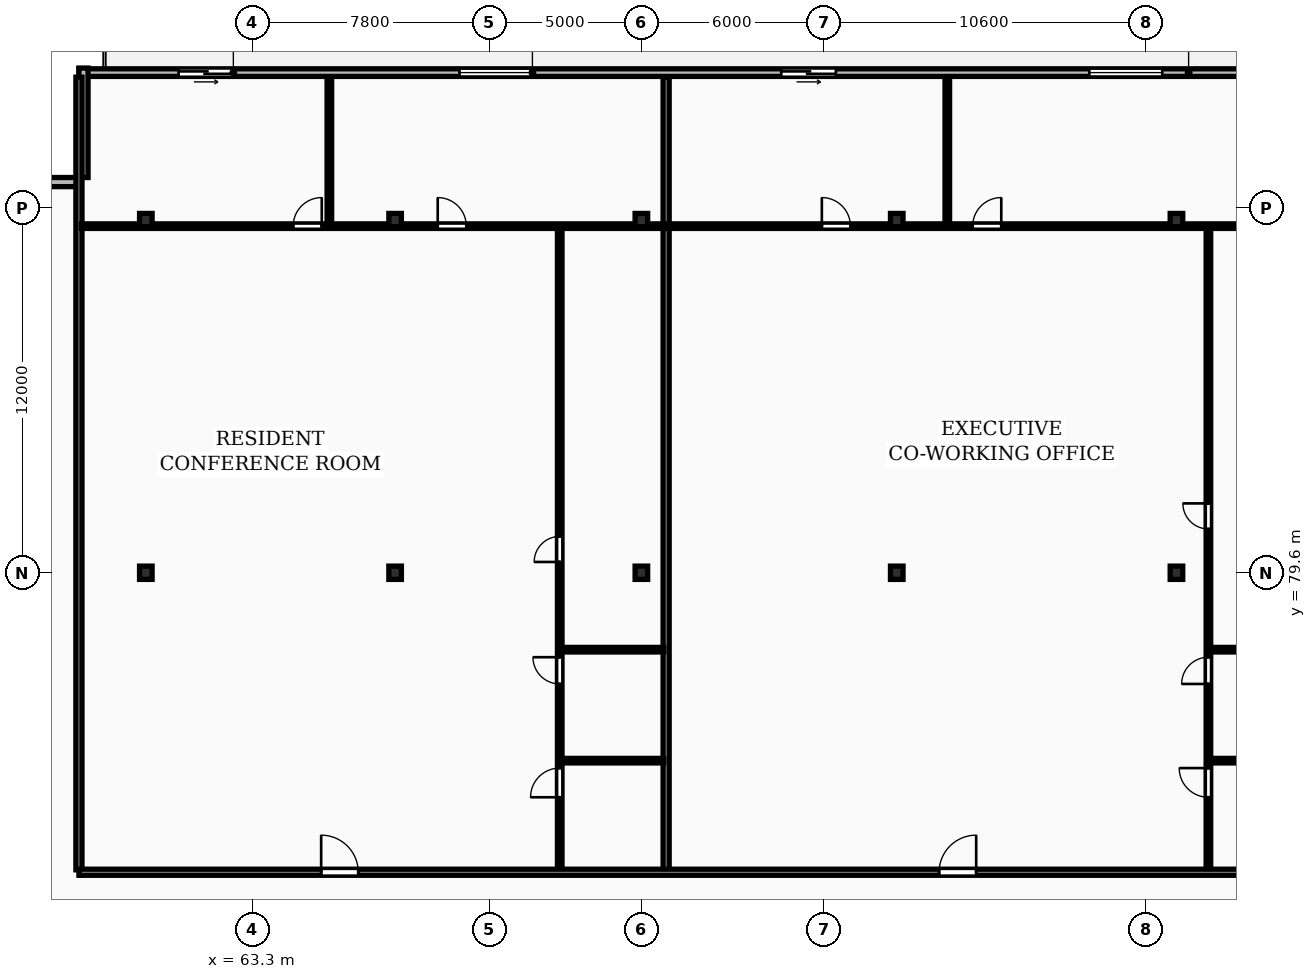
"""IFC4 building model, lengths in metres.
Left out: names, types, materials, properties, quantities, classifications, styles, units other than length and angle.
Written with IfcOpenShell. Run it as: python <this file> out.ifc"""

import sys

from ifc_helpers import new_model, si_unit, direction, frame, frame_2d, origin, origin_2d, place, context, subcontext, project, spatial, rectangle, i_section, extrude, element, fill, save


model = new_model("IFC4")
c1 = context("Model", 3, precision=1e-05, world=origin(), true_north=direction((0.0, 1.0)))
c2 = subcontext(c1, "Body", "Model", "MODEL_VIEW")
j1 = project(units=[si_unit("LENGTHUNIT", "METRE"), si_unit("PLANEANGLEUNIT", "RADIAN")], contexts=[c1])
p1 = place(None, origin())
s1 = spatial("IfcSite", under=j1, at=p1, CompositionType="ELEMENT")
p2 = place(p1, origin())
s2 = spatial("IfcBuilding", under=s1, at=p2, CompositionType="ELEMENT")
p3 = place(p2, frame((0.0, 0.0, 142.9)))
s3 = spatial("IfcBuildingStorey", under=s2, at=p3, CompositionType="ELEMENT", Elevation=142.9)
for number, where, z_axis, x_axis in (
    (1, (59.8, 79.6, 0.0), (0.0, 0.0, 1.0), (1.0, 0.0, 0.0)),
    (2, (59.8, 91.2, 0.0), (0.0, 0.0, 1.0), (1.0, 0.0, 0.0)),
    (3, (68.0, 79.6, 0.0), (0.0, 0.0, 1.0), (1.0, 0.0, 0.0)),
    (4, (68.0, 91.2, 0.0), (0.0, 0.0, 1.0), (1.0, 0.0, 0.0)),
    (5, (76.1, 79.6, 0.0), (0.0, 0.0, 1.0), (1.0, 0.0, 0.0)),
    (6, (76.1, 91.2, 0.0), (0.0, 0.0, 1.0), (1.0, 0.0, 0.0)),
    (7, (84.5, 79.6, 0.0), (0.0, 0.0, 1.0), (1.0, 0.0, 0.0)),
    (8, (84.5, 91.2, 0.0), (0.0, 0.0, 1.0), (1.0, 0.0, 0.0)),
    (9, (93.7, 79.6, 0.0), (0.0, 0.0, 1.0), (1.0, 0.0, 0.0)),
    (10, (93.7, 91.2, 0.0), (0.0, 0.0, 1.0), (1.0, 0.0, 0.0)),
):
    element("IfcColumn", number, at=place(p3, frame(where, z_axis=z_axis, x_axis=x_axis)), inside=s3, PredefinedType="COLUMN", context=c2, shape_type="SweptSolid", body=[
        extrude(i_section(OverallWidth=0.412, OverallDepth=0.437, WebThickness=0.036, FlangeThickness=0.052, FilletRadius=0.015, at=origin_2d()), origin(), (0.0, 0.0, 1.0), 3.6),
    ])
p4 = place(p3, frame((130.6, 96.05, 0.0), z_axis=(0.0, 0.0, 1.0), x_axis=(-1.0, 0.0, 0.0)))
e11 = element("IfcWall", 11, at=p4, inside=s3, PredefinedType="STANDARD", context=c2, shape_type="SweptSolid", body=[
    extrude(rectangle(XDim=73.0, YDim=0.25, at=frame_2d((36.5, 0.0))), origin(), (0.0, 0.0, 1.0), 3.31),
])
p5 = place(p4, frame((67.921, 0.0, 0.0)))
e12 = element("IfcOpeningElement", 12, at=p5, cuts=e11, PredefinedType="OPENING", context=c2, shape_type="SweptSolid", body=[
    extrude(rectangle(XDim=1.8, YDim=2.2, at=frame_2d((0.9, 1.1))), frame((0.0, 0.135, 0.0), z_axis=(0.0, -1.0, 0.0), x_axis=(1.0, 0.0, 0.0)), (0.0, 0.0, 1.0), 0.27),
])
p6 = place(p4, frame((58.084, 0.0, 0.85)))
e13 = element("IfcOpeningElement", 13, at=p6, cuts=e11, PredefinedType="OPENING", context=c2, shape_type="SweptSolid", body=[
    extrude(rectangle(XDim=2.4, YDim=1.9, at=frame_2d((1.2, 0.95))), frame((0.0, 0.135, 0.0), z_axis=(0.0, -1.0, 0.0), x_axis=(1.0, 0.0, 0.0)), (0.0, 0.0, 1.0), 0.27),
])
p7 = place(p4, frame((48.101, 0.0, 0.0)))
e14 = element("IfcOpeningElement", 14, at=p7, cuts=e11, PredefinedType="OPENING", context=c2, shape_type="SweptSolid", body=[
    extrude(rectangle(XDim=1.8, YDim=2.2, at=frame_2d((0.9, 1.1))), frame((0.0, 0.135, 0.0), z_axis=(0.0, -1.0, 0.0), x_axis=(1.0, 0.0, 0.0)), (0.0, 0.0, 1.0), 0.27),
])
p8 = place(p4, frame((37.368, 0.0, 0.85)))
e15 = element("IfcOpeningElement", 15, at=p8, cuts=e11, PredefinedType="OPENING", context=c2, shape_type="SweptSolid", body=[
    extrude(rectangle(XDim=2.4, YDim=1.9, at=frame_2d((1.2, 0.95))), frame((0.0, 0.135, 0.0), z_axis=(0.0, -1.0, 0.0), x_axis=(1.0, 0.0, 0.0)), (0.0, 0.0, 1.0), 0.27),
])
p9 = place(p4, frame((22.445, 0.0, 0.85)))
e16 = element("IfcOpeningElement", 16, at=p9, cuts=e11, PredefinedType="OPENING", context=c2, shape_type="SweptSolid", body=[
    extrude(rectangle(XDim=2.4, YDim=1.9, at=frame_2d((1.2, 0.95))), frame((0.0, 0.135, 0.0), z_axis=(0.0, -1.0, 0.0), x_axis=(1.0, 0.0, 0.0)), (0.0, 0.0, 1.0), 0.27),
])
p10 = place(p4, frame((17.845, 0.0, 0.85)))
e17 = element("IfcOpeningElement", 17, at=p10, cuts=e11, PredefinedType="OPENING", context=c2, shape_type="SweptSolid", body=[
    extrude(rectangle(XDim=2.4, YDim=1.9, at=frame_2d((1.2, 0.95))), frame((0.0, 0.135, 0.0), z_axis=(0.0, -1.0, 0.0), x_axis=(1.0, 0.0, 0.0)), (0.0, 0.0, 1.0), 0.27),
])
p11 = place(p4, frame((28.239, 0.0, 0.0)))
e18 = element("IfcOpeningElement", 18, at=p11, cuts=e11, PredefinedType="OPENING", context=c2, shape_type="SweptSolid", body=[
    extrude(rectangle(XDim=1.8, YDim=2.2, at=frame_2d((0.9, 1.1))), frame((0.0, 0.135, 0.0), z_axis=(0.0, -1.0, 0.0), x_axis=(1.0, 0.0, 0.0)), (0.0, 0.0, 1.0), 0.27),
])
p12 = place(p4, frame((14.599, 0.0, 0.85)))
e19 = element("IfcOpeningElement", 19, at=p12, cuts=e11, PredefinedType="OPENING", context=c2, shape_type="SweptSolid", body=[
    extrude(rectangle(XDim=1.8, YDim=1.8, at=frame_2d((0.9, 0.9))), frame((0.0, 0.135, 0.0), z_axis=(0.0, -1.0, 0.0), x_axis=(1.0, 0.0, 0.0)), (0.0, 0.0, 1.0), 0.27),
])
p13 = place(p4, frame((8.234, 0.0, 0.0)))
e20 = element("IfcOpeningElement", 20, at=p13, cuts=e11, PredefinedType="OPENING", context=c2, shape_type="SweptSolid", body=[
    extrude(rectangle(XDim=1.8, YDim=2.2, at=frame_2d((0.9, 1.1))), frame((0.0, 0.135, 0.0), z_axis=(0.0, -1.0, 0.0), x_axis=(1.0, 0.0, 0.0)), (0.0, 0.0, 1.0), 0.27),
])
p14 = place(p4, frame((0.9, 0.0, 0.85)))
e21 = element("IfcOpeningElement", 21, at=p14, cuts=e11, PredefinedType="OPENING", context=c2, shape_type="SweptSolid", body=[
    extrude(rectangle(XDim=2.4, YDim=1.9, at=frame_2d((1.2, 0.95))), frame((0.0, 0.135, 0.0), z_axis=(0.0, -1.0, 0.0), x_axis=(1.0, 0.0, 0.0)), (0.0, 0.0, 1.0), 0.27),
])
p15 = place(p3, frame((57.75, 96.2, 0.0), z_axis=(0.0, 0.0, 1.0), x_axis=(0.0, -1.0, 0.0)))
e22 = element("IfcWall", 22, at=p15, inside=s3, PredefinedType="STANDARD", context=c2, shape_type="SweptSolid", body=[
    extrude(rectangle(XDim=3.6, YDim=0.3, at=frame_2d((1.8, 0.0))), origin(), (0.0, 0.0, 1.0), 3.31),
])
p16 = place(p3, frame((57.6, 92.45, 0.0), z_axis=(0.0, 0.0, 1.0), x_axis=(-1.0, 0.0, 0.0)))
e23 = element("IfcWall", 23, at=p16, inside=s3, PredefinedType="STANDARD", context=c2, shape_type="SweptSolid", body=[
    extrude(rectangle(XDim=3.6, YDim=0.3, at=frame_2d((1.8, 0.0))), origin(), (0.0, 0.0, 1.0), 3.31),
])
for number, where, z_axis, x_axis in (
    (24, (57.6, 69.83, 0.0), (0.0, 0.0, 1.0), (0.0, 1.0, 0.0)),
    (25, (76.914, 69.83, 0.0), (0.0, 0.0, 1.0), (0.0, 1.0, 0.0)),
):
    element("IfcWall", number, at=place(p3, frame(where, z_axis=z_axis, x_axis=x_axis)), inside=s3, PredefinedType="PARTITIONING", context=c2, shape_type="SweptSolid", body=[
        extrude(rectangle(XDim=26.07, YDim=0.2, at=frame_2d((13.035, 0.0))), origin(), (0.0, 0.0, 1.0), 3.31),
    ])
for number, where, z_axis, x_axis in (
    (26, (73.474, 73.42, 0.0), (0.0, 0.0, 1.0), (1.0, 0.0, 0.0)),
    (27, (73.474, 77.07, 0.0), (0.0, 0.0, 1.0), (1.0, 0.0, 0.0)),
):
    element("IfcWall", number, at=place(p3, frame(where, z_axis=z_axis, x_axis=x_axis)), inside=s3, PredefinedType="PARTITIONING", context=c2, shape_type="SweptSolid", body=[
        extrude(rectangle(XDim=3.36, YDim=0.15, at=frame_2d((1.68, 0.0))), origin(), (0.0, 0.0, 1.0), 3.31),
    ])
p17 = place(p3, frame((73.414, 69.81, 0.0), z_axis=(0.0, 0.0, 1.0), x_axis=(0.0, 1.0, 0.0)))
e28 = element("IfcWall", 28, at=p17, inside=s3, PredefinedType="PARTITIONING", context=c2, shape_type="SweptSolid", body=[
    extrude(rectangle(XDim=21.13, YDim=0.15, at=frame_2d((10.565, 0.0))), origin(), (0.0, 0.0, 1.0), 3.31),
])
p18 = place(p17, frame((2.406, 0.0, 0.0)))
e29 = element("IfcOpeningElement", 29, at=p18, cuts=e28, PredefinedType="OPENING", context=c2, shape_type="SweptSolid", body=[
    extrude(rectangle(XDim=0.96, YDim=2.1, at=frame_2d((0.48, 1.05))), frame((0.0, 0.085, 0.0), z_axis=(0.0, -1.0, 0.0), x_axis=(1.0, 0.0, 0.0)), (0.0, 0.0, 1.0), 0.17),
])
p19 = place(p17, frame((6.133, 0.0, 0.0)))
e30 = element("IfcOpeningElement", 30, at=p19, cuts=e28, PredefinedType="OPENING", context=c2, shape_type="SweptSolid", body=[
    extrude(rectangle(XDim=0.88, YDim=2.06, at=frame_2d((0.44, 1.03))), frame((0.0, 0.085, 0.0), z_axis=(0.0, -1.0, 0.0), x_axis=(1.0, 0.0, 0.0)), (0.0, 0.0, 1.0), 0.17),
])
p20 = place(p17, frame((10.145, 0.0, 0.0)))
e31 = element("IfcOpeningElement", 31, at=p20, cuts=e28, PredefinedType="OPENING", context=c2, shape_type="SweptSolid", body=[
    extrude(rectangle(XDim=0.84, YDim=2.04, at=frame_2d((0.42, 1.02))), frame((0.0, 0.085, 0.0), z_axis=(0.0, -1.0, 0.0), x_axis=(1.0, 0.0, 0.0)), (0.0, 0.0, 1.0), 0.17),
])
p21 = place(p3, frame((65.837, 91.08, 0.0), z_axis=(0.0, 0.0, 1.0), x_axis=(0.0, 1.0, 0.0)))
e32 = element("IfcWall", 32, at=p21, inside=s3, PredefinedType="PARTITIONING", context=c2, shape_type="SweptSolid", body=[
    extrude(rectangle(XDim=4.82, YDim=0.15, at=frame_2d((2.41, 0.0))), origin(), (0.0, 0.0, 1.0), 3.31),
])
p22 = place(p3, frame((57.68, 91.0, 0.0), z_axis=(0.0, 0.0, 1.0), x_axis=(1.0, 0.0, 0.0)))
e33 = element("IfcWall", 33, at=p22, inside=s3, PredefinedType="PARTITIONING", context=c2, shape_type="SweptSolid", body=[
    extrude(rectangle(XDim=19.154, YDim=0.15, at=frame_2d((9.577, 0.0))), origin(), (0.0, 0.0, 1.0), 3.003),
])
p23 = place(p22, frame((6.967, 0.0, 0.0)))
e34 = element("IfcOpeningElement", 34, at=p23, cuts=e33, PredefinedType="OPENING", context=c2, shape_type="SweptSolid", body=[
    extrude(rectangle(XDim=0.94, YDim=2.1, at=frame_2d((0.47, 1.05))), frame((0.0, 0.085, 0.0), z_axis=(0.0, -1.0, 0.0), x_axis=(1.0, 0.0, 0.0)), (0.0, 0.0, 1.0), 0.17),
])
p24 = place(p22, frame((11.721, 0.0, 0.0)))
e35 = element("IfcOpeningElement", 35, at=p24, cuts=e33, PredefinedType="OPENING", context=c2, shape_type="SweptSolid", body=[
    extrude(rectangle(XDim=0.94, YDim=2.1, at=frame_2d((0.47, 1.05))), frame((0.0, 0.085, 0.0), z_axis=(0.0, -1.0, 0.0), x_axis=(1.0, 0.0, 0.0)), (0.0, 0.0, 1.0), 0.17),
])
for number, where, z_axis, x_axis in (
    (36, (94.811, 73.42, 0.0), (0.0, 0.0, 1.0), (1.0, 0.0, 0.0)),
    (37, (94.811, 77.07, 0.0), (0.0, 0.0, 1.0), (1.0, 0.0, 0.0)),
):
    element("IfcWall", number, at=place(p3, frame(where, z_axis=z_axis, x_axis=x_axis)), inside=s3, PredefinedType="PARTITIONING", context=c2, shape_type="SweptSolid", body=[
        extrude(rectangle(XDim=3.13, YDim=0.15, at=frame_2d((1.565, 0.0))), origin(), (0.0, 0.0, 1.0), 3.31),
    ])
p25 = place(p3, frame((94.751, 69.81, 0.0), z_axis=(0.0, 0.0, 1.0), x_axis=(0.0, 1.0, 0.0)))
e38 = element("IfcWall", 38, at=p25, inside=s3, PredefinedType="PARTITIONING", context=c2, shape_type="SweptSolid", body=[
    extrude(rectangle(XDim=21.13, YDim=0.15, at=frame_2d((10.565, 0.0))), origin(), (0.0, 0.0, 1.0), 3.31),
])
p26 = place(p25, frame((2.406, 0.0, 0.0)))
e39 = element("IfcOpeningElement", 39, at=p26, cuts=e38, PredefinedType="OPENING", context=c2, shape_type="SweptSolid", body=[
    extrude(rectangle(XDim=0.96, YDim=2.1, at=frame_2d((0.48, 1.05))), frame((0.0, 0.085, 0.0), z_axis=(0.0, -1.0, 0.0), x_axis=(1.0, 0.0, 0.0)), (0.0, 0.0, 1.0), 0.17),
])
p27 = place(p25, frame((6.133, 0.0, 0.0)))
e40 = element("IfcOpeningElement", 40, at=p27, cuts=e38, PredefinedType="OPENING", context=c2, shape_type="SweptSolid", body=[
    extrude(rectangle(XDim=0.88, YDim=2.06, at=frame_2d((0.44, 1.03))), frame((0.0, 0.085, 0.0), z_axis=(0.0, -1.0, 0.0), x_axis=(1.0, 0.0, 0.0)), (0.0, 0.0, 1.0), 0.17),
])
p28 = place(p25, frame((11.231, 0.0, 0.0)))
e41 = element("IfcOpeningElement", 41, at=p28, cuts=e38, PredefinedType="OPENING", context=c2, shape_type="SweptSolid", body=[
    extrude(rectangle(XDim=0.84, YDim=2.04, at=frame_2d((0.42, 1.02))), frame((0.0, 0.085, 0.0), z_axis=(0.0, -1.0, 0.0), x_axis=(1.0, 0.0, 0.0)), (0.0, 0.0, 1.0), 0.17),
])
p29 = place(p3, frame((86.163, 91.08, 0.0), z_axis=(0.0, 0.0, 1.0), x_axis=(0.0, 1.0, 0.0)))
e42 = element("IfcWall", 42, at=p29, inside=s3, PredefinedType="PARTITIONING", context=c2, shape_type="SweptSolid", body=[
    extrude(rectangle(XDim=4.82, YDim=0.15, at=frame_2d((2.41, 0.0))), origin(), (0.0, 0.0, 1.0), 3.31),
])
p30 = place(p3, frame((76.994, 91.0, 0.0), z_axis=(0.0, 0.0, 1.0), x_axis=(1.0, 0.0, 0.0)))
e43 = element("IfcWall", 43, at=p30, inside=s3, PredefinedType="PARTITIONING", context=c2, shape_type="SweptSolid", body=[
    extrude(rectangle(XDim=20.947, YDim=0.15, at=frame_2d((10.474, 0.0))), origin(), (0.0, 0.0, 1.0), 3.003),
])
p31 = place(p30, frame((5.042, 0.0, 0.0)))
e44 = element("IfcOpeningElement", 44, at=p31, cuts=e43, PredefinedType="OPENING", context=c2, shape_type="SweptSolid", body=[
    extrude(rectangle(XDim=0.94, YDim=2.1, at=frame_2d((0.47, 1.05))), frame((0.0, 0.085, 0.0), z_axis=(0.0, -1.0, 0.0), x_axis=(1.0, 0.0, 0.0)), (0.0, 0.0, 1.0), 0.17),
])
p32 = place(p30, frame((10.004, 0.0, 0.0)))
e45 = element("IfcOpeningElement", 45, at=p32, cuts=e43, PredefinedType="OPENING", context=c2, shape_type="SweptSolid", body=[
    extrude(rectangle(XDim=0.94, YDim=2.1, at=frame_2d((0.47, 1.05))), frame((0.0, 0.085, 0.0), z_axis=(0.0, -1.0, 0.0), x_axis=(1.0, 0.0, 0.0)), (0.0, 0.0, 1.0), 0.17),
])
p33 = place(p3, frame((57.6, 69.75, 0.0), z_axis=(0.0, 0.0, 1.0), x_axis=(1.0, 0.0, 0.0)))
e46 = element("IfcWall", 46, at=p33, inside=s3, PredefinedType="PARTITIONING", context=c2, shape_type="SweptSolid", body=[
    extrude(rectangle(XDim=73.0, YDim=0.2, at=frame_2d((36.5, 0.0))), origin(), (0.0, 0.0, 1.0), 3.31),
])
p34 = place(p33, frame((7.967, 0.0, 0.0)))
e47 = element("IfcOpeningElement", 47, at=p34, cuts=e46, PredefinedType="OPENING", context=c2, shape_type="SweptSolid", body=[
    extrude(rectangle(XDim=1.22, YDim=2.18, at=frame_2d((0.61, 1.09))), frame((0.0, 0.11, 0.0), z_axis=(0.0, -1.0, 0.0), x_axis=(1.0, 0.0, 0.0)), (0.0, 0.0, 1.0), 0.22),
])
p35 = place(p33, frame((28.293, 0.0, 0.0)))
e48 = element("IfcOpeningElement", 48, at=p35, cuts=e46, PredefinedType="OPENING", context=c2, shape_type="SweptSolid", body=[
    extrude(rectangle(XDim=1.22, YDim=2.18, at=frame_2d((0.61, 1.09))), frame((0.0, 0.11, 0.0), z_axis=(0.0, -1.0, 0.0), x_axis=(1.0, 0.0, 0.0)), (0.0, 0.0, 1.0), 0.22),
])
p36 = place(p33, frame((42.466, 0.0, 0.0)))
e49 = element("IfcOpeningElement", 49, at=p36, cuts=e46, PredefinedType="OPENING", context=c2, shape_type="SweptSolid", body=[
    extrude(rectangle(XDim=0.95, YDim=2.15, at=frame_2d((0.475, 1.075))), frame((0.0, 0.11, 0.0), z_axis=(0.0, -1.0, 0.0), x_axis=(1.0, 0.0, 0.0)), (0.0, 0.0, 1.0), 0.22),
])
p37 = place(p33, frame((60.738, 0.0, 0.0)))
e50 = element("IfcOpeningElement", 50, at=p37, cuts=e46, PredefinedType="OPENING", context=c2, shape_type="SweptSolid", body=[
    extrude(rectangle(XDim=0.95, YDim=2.15, at=frame_2d((0.475, 1.075))), frame((0.0, 0.11, 0.0), z_axis=(0.0, -1.0, 0.0), x_axis=(1.0, 0.0, 0.0)), (0.0, 0.0, 1.0), 0.22),
])
p38 = place(p5, origin())
e51 = element("IfcDoor", 51, at=p38, inside=s3, OperationType="SLIDING_TO_LEFT", PredefinedType="DOOR", context=c2, shape_type="SweptSolid", body=[
    extrude(rectangle(XDim=1.8, YDim=2.2, at=frame_2d((0.9, 1.1))), frame((0.0, 0.025, 0.0), z_axis=(0.0, -1.0, 0.0), x_axis=(1.0, 0.0, 0.0)), (0.0, 0.0, 1.0), 0.05),
])
fill(e12, e51)
p39 = place(p6, origin())
e52 = element("IfcWindow", 52, at=p39, inside=s3, PartitioningType="DOUBLE_PANEL_VERTICAL", PredefinedType="WINDOW", context=c2, shape_type="SweptSolid", body=[
    extrude(rectangle(XDim=2.4, YDim=1.9, at=frame_2d((1.2, 0.95))), frame((0.0, 0.03, 0.0), z_axis=(0.0, -1.0, 0.0), x_axis=(1.0, 0.0, 0.0)), (0.0, 0.0, 1.0), 0.06),
])
fill(e13, e52)
p40 = place(p7, origin())
e53 = element("IfcDoor", 53, at=p40, inside=s3, OperationType="SLIDING_TO_LEFT", PredefinedType="DOOR", context=c2, shape_type="SweptSolid", body=[
    extrude(rectangle(XDim=1.8, YDim=2.2, at=frame_2d((0.9, 1.1))), frame((0.0, 0.025, 0.0), z_axis=(0.0, -1.0, 0.0), x_axis=(1.0, 0.0, 0.0)), (0.0, 0.0, 1.0), 0.05),
])
fill(e14, e53)
p41 = place(p8, origin())
e54 = element("IfcWindow", 54, at=p41, inside=s3, PartitioningType="DOUBLE_PANEL_VERTICAL", PredefinedType="WINDOW", context=c2, shape_type="SweptSolid", body=[
    extrude(rectangle(XDim=2.4, YDim=1.9, at=frame_2d((1.2, 0.95))), frame((0.0, 0.03, 0.0), z_axis=(0.0, -1.0, 0.0), x_axis=(1.0, 0.0, 0.0)), (0.0, 0.0, 1.0), 0.06),
])
fill(e15, e54)
p42 = place(p18, origin())
e55 = element("IfcDoor", 55, at=p42, inside=s3, OperationType="SINGLE_SWING_LEFT", PredefinedType="DOOR", context=c2, shape_type="SweptSolid", body=[
    extrude(rectangle(XDim=0.96, YDim=2.1, at=frame_2d((0.48, 1.05))), frame((0.0, 0.025, 0.0), z_axis=(0.0, -1.0, 0.0), x_axis=(1.0, 0.0, 0.0)), (0.0, 0.0, 1.0), 0.05),
])
fill(e29, e55)
p43 = place(p19, origin())
e56 = element("IfcDoor", 56, at=p43, inside=s3, OperationType="SINGLE_SWING_RIGHT", PredefinedType="DOOR", context=c2, shape_type="SweptSolid", body=[
    extrude(rectangle(XDim=0.88, YDim=2.06, at=frame_2d((0.44, 1.03))), frame((0.0, 0.025, 0.0), z_axis=(0.0, -1.0, 0.0), x_axis=(1.0, 0.0, 0.0)), (0.0, 0.0, 1.0), 0.05),
])
fill(e30, e56)
p44 = place(p20, origin())
e57 = element("IfcDoor", 57, at=p44, inside=s3, OperationType="SINGLE_SWING_LEFT", PredefinedType="DOOR", context=c2, shape_type="SweptSolid", body=[
    extrude(rectangle(XDim=0.84, YDim=2.04, at=frame_2d((0.42, 1.02))), frame((0.0, 0.025, 0.0), z_axis=(0.0, -1.0, 0.0), x_axis=(1.0, 0.0, 0.0)), (0.0, 0.0, 1.0), 0.05),
])
fill(e31, e57)
p45 = place(p23, origin())
e58 = element("IfcDoor", 58, at=p45, inside=s3, OperationType="SINGLE_SWING_RIGHT", PredefinedType="DOOR", context=c2, shape_type="SweptSolid", body=[
    extrude(rectangle(XDim=0.94, YDim=2.1, at=frame_2d((0.47, 1.05))), frame((0.0, 0.025, 0.0), z_axis=(0.0, -1.0, 0.0), x_axis=(1.0, 0.0, 0.0)), (0.0, 0.0, 1.0), 0.05),
])
fill(e34, e58)
p46 = place(p24, origin())
e59 = element("IfcDoor", 59, at=p46, inside=s3, OperationType="SINGLE_SWING_LEFT", PredefinedType="DOOR", context=c2, shape_type="SweptSolid", body=[
    extrude(rectangle(XDim=0.94, YDim=2.1, at=frame_2d((0.47, 1.05))), frame((0.0, 0.025, 0.0), z_axis=(0.0, -1.0, 0.0), x_axis=(1.0, 0.0, 0.0)), (0.0, 0.0, 1.0), 0.05),
])
fill(e35, e59)
p47 = place(p26, origin())
e60 = element("IfcDoor", 60, at=p47, inside=s3, OperationType="SINGLE_SWING_RIGHT", PredefinedType="DOOR", context=c2, shape_type="SweptSolid", body=[
    extrude(rectangle(XDim=0.96, YDim=2.1, at=frame_2d((0.48, 1.05))), frame((0.0, 0.025, 0.0), z_axis=(0.0, -1.0, 0.0), x_axis=(1.0, 0.0, 0.0)), (0.0, 0.0, 1.0), 0.05),
])
fill(e39, e60)
p48 = place(p27, origin())
e61 = element("IfcDoor", 61, at=p48, inside=s3, OperationType="SINGLE_SWING_LEFT", PredefinedType="DOOR", context=c2, shape_type="SweptSolid", body=[
    extrude(rectangle(XDim=0.88, YDim=2.06, at=frame_2d((0.44, 1.03))), frame((0.0, 0.025, 0.0), z_axis=(0.0, -1.0, 0.0), x_axis=(1.0, 0.0, 0.0)), (0.0, 0.0, 1.0), 0.05),
])
fill(e40, e61)
p49 = place(p28, origin())
e62 = element("IfcDoor", 62, at=p49, inside=s3, OperationType="SINGLE_SWING_RIGHT", PredefinedType="DOOR", context=c2, shape_type="SweptSolid", body=[
    extrude(rectangle(XDim=0.84, YDim=2.04, at=frame_2d((0.42, 1.02))), frame((0.0, 0.025, 0.0), z_axis=(0.0, -1.0, 0.0), x_axis=(1.0, 0.0, 0.0)), (0.0, 0.0, 1.0), 0.05),
])
fill(e41, e62)
p50 = place(p31, origin())
e63 = element("IfcDoor", 63, at=p50, inside=s3, OperationType="SINGLE_SWING_LEFT", PredefinedType="DOOR", context=c2, shape_type="SweptSolid", body=[
    extrude(rectangle(XDim=0.94, YDim=2.1, at=frame_2d((0.47, 1.05))), frame((0.0, 0.025, 0.0), z_axis=(0.0, -1.0, 0.0), x_axis=(1.0, 0.0, 0.0)), (0.0, 0.0, 1.0), 0.05),
])
fill(e44, e63)
p51 = place(p32, origin())
e64 = element("IfcDoor", 64, at=p51, inside=s3, OperationType="SINGLE_SWING_RIGHT", PredefinedType="DOOR", context=c2, shape_type="SweptSolid", body=[
    extrude(rectangle(XDim=0.94, YDim=2.1, at=frame_2d((0.47, 1.05))), frame((0.0, 0.025, 0.0), z_axis=(0.0, -1.0, 0.0), x_axis=(1.0, 0.0, 0.0)), (0.0, 0.0, 1.0), 0.05),
])
fill(e45, e64)
p52 = place(p34, origin())
e65 = element("IfcDoor", 65, at=p52, inside=s3, OperationType="SINGLE_SWING_LEFT", PredefinedType="DOOR", context=c2, shape_type="SweptSolid", body=[
    extrude(rectangle(XDim=1.22, YDim=2.18, at=frame_2d((0.61, 1.09))), frame((0.0, 0.025, 0.0), z_axis=(0.0, -1.0, 0.0), x_axis=(1.0, 0.0, 0.0)), (0.0, 0.0, 1.0), 0.05),
])
fill(e47, e65)
p53 = place(p35, origin())
e66 = element("IfcDoor", 66, at=p53, inside=s3, OperationType="SINGLE_SWING_RIGHT", PredefinedType="DOOR", context=c2, shape_type="SweptSolid", body=[
    extrude(rectangle(XDim=1.22, YDim=2.18, at=frame_2d((0.61, 1.09))), frame((0.0, 0.025, 0.0), z_axis=(0.0, -1.0, 0.0), x_axis=(1.0, 0.0, 0.0)), (0.0, 0.0, 1.0), 0.05),
])
fill(e48, e66)
save(model, sys.argv[1])
